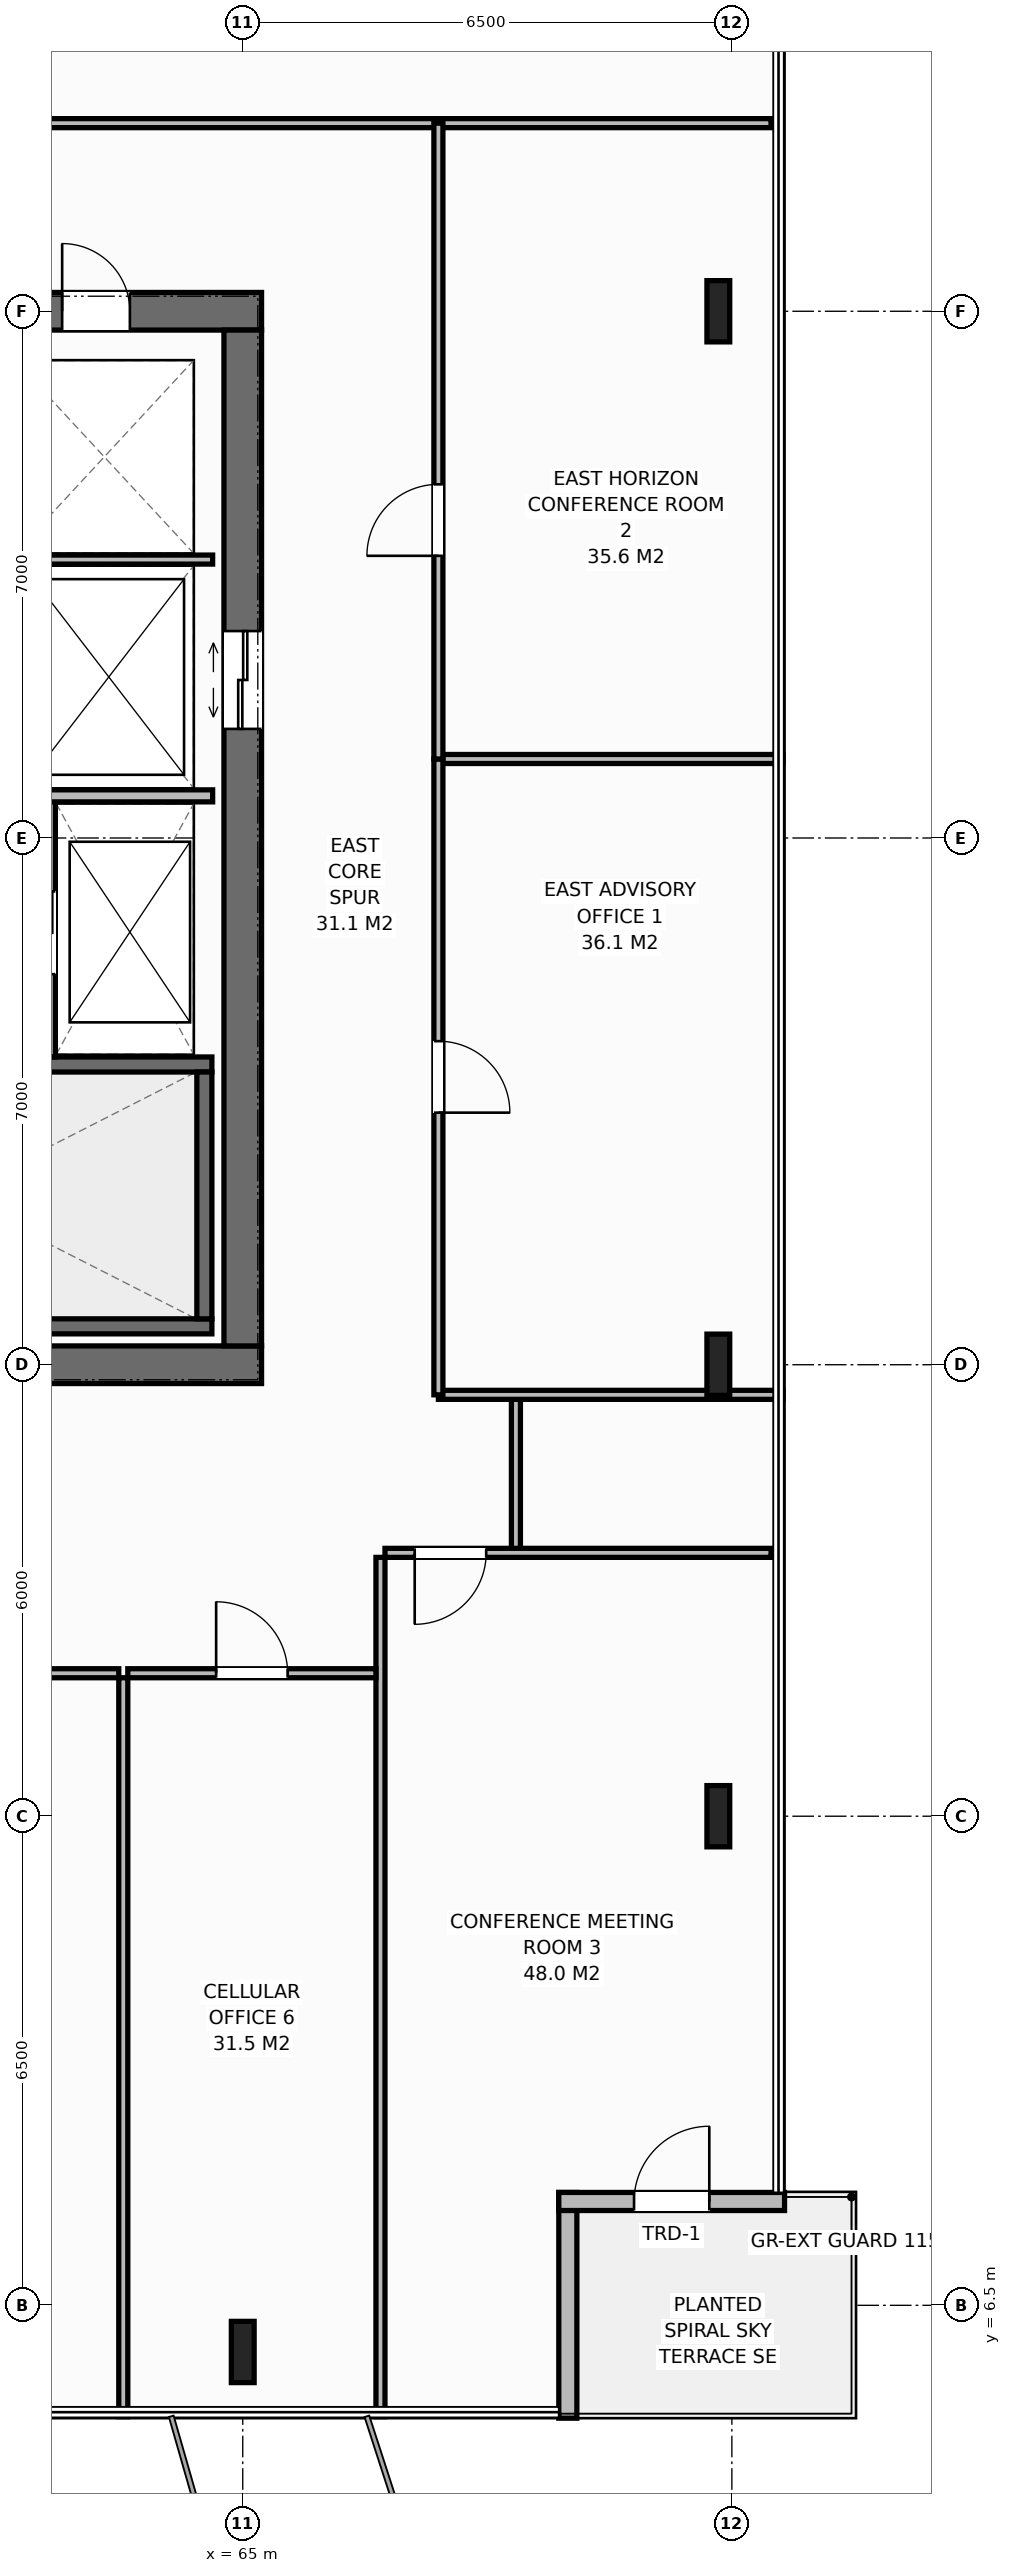
"""IFC4 building model, lengths in metres.
Left out: names, types, materials, properties, quantities, classifications, styles, units other than length and angle.
Written with IfcOpenShell. Run it as: python <this file> out.ifc"""

import sys

from ifc_helpers import new_model, si_unit, direction, frame, frame_2d, origin, origin_2d, place, context, subcontext, project, spatial, rectangle, i_section, extrude, element, fill, save


model = new_model("IFC4")
c1 = context("Model", 3, precision=1e-05, world=origin(), true_north=direction((0.0, 1.0)))
c2 = subcontext(c1, "Body", "Model", "MODEL_VIEW")
j1 = project(units=[si_unit("LENGTHUNIT", "METRE"), si_unit("PLANEANGLEUNIT", "RADIAN")], contexts=[c1])
p1 = place(None, origin())
s1 = spatial("IfcSite", under=j1, at=p1, CompositionType="ELEMENT")
p2 = place(p1, origin())
s2 = spatial("IfcBuilding", under=s1, at=p2, CompositionType="ELEMENT")
p3 = place(p2, frame((0.0, 0.0, 244.2)))
s3 = spatial("IfcBuildingStorey", under=s2, at=p3, CompositionType="ELEMENT", Elevation=244.2)
p4 = place(p3, frame((51.75, 19.0, 0.0), z_axis=(0.0, 0.0, 1.0), x_axis=(1.0, 0.0, 0.0)))
e1 = element("IfcWall", 1, at=p4, inside=s3, PredefinedType="SHEAR", context=c2, shape_type="SweptSolid", body=[
    extrude(rectangle(XDim=13.5, YDim=0.5, at=frame_2d((6.75, 0.0))), origin(), (0.0, 0.0, 1.0), 3.8),
])
p5 = place(p4, frame((2.97, 0.0, 0.0)))
e2 = element("IfcOpeningElement", 2, at=p5, cuts=e1, PredefinedType="OPENING", context=c2, shape_type="SweptSolid", body=[
    extrude(rectangle(XDim=1.4, YDim=2.2, at=frame_2d((0.7, 1.1))), frame((0.0, 0.26, 0.0), z_axis=(0.0, -1.0, 0.0), x_axis=(1.0, 0.0, 0.0)), (0.0, 0.0, 1.0), 0.52),
])
p6 = place(p3, frame((51.75, 33.0, 0.0), z_axis=(0.0, 0.0, 1.0), x_axis=(1.0, 0.0, 0.0)))
e3 = element("IfcWall", 3, at=p6, inside=s3, PredefinedType="SHEAR", context=c2, shape_type="SweptSolid", body=[
    extrude(rectangle(XDim=13.5, YDim=0.5, at=frame_2d((6.75, 0.0))), origin(), (0.0, 0.0, 1.0), 3.8),
])
p7 = place(p6, frame((2.97, 0.0, 0.0)))
e4 = element("IfcOpeningElement", 4, at=p7, cuts=e3, PredefinedType="OPENING", context=c2, shape_type="SweptSolid", body=[
    extrude(rectangle(XDim=1.4, YDim=2.2, at=frame_2d((0.7, 1.1))), frame((0.0, 0.26, 0.0), z_axis=(0.0, -1.0, 0.0), x_axis=(1.0, 0.0, 0.0)), (0.0, 0.0, 1.0), 0.52),
])
p8 = place(p6, frame((10.85, 0.0, 0.0)))
e5 = element("IfcOpeningElement", 5, at=p8, cuts=e3, PredefinedType="OPENING", context=c2, shape_type="SweptSolid", body=[
    extrude(rectangle(XDim=0.9, YDim=2.15, at=frame_2d((0.45, 1.075))), frame((0.0, 0.26, 0.0), z_axis=(0.0, -1.0, 0.0), x_axis=(1.0, 0.0, 0.0)), (0.0, 0.0, 1.0), 0.52),
])
p9 = place(p6, frame((5.8, 0.0, 0.0)))
e6 = element("IfcOpeningElement", 6, at=p9, cuts=e3, PredefinedType="OPENING", context=c2, shape_type="SweptSolid", body=[
    extrude(rectangle(XDim=0.9, YDim=2.15, at=frame_2d((0.45, 1.075))), frame((0.0, 0.26, 0.0), z_axis=(0.0, -1.0, 0.0), x_axis=(1.0, 0.0, 0.0)), (0.0, 0.0, 1.0), 0.52),
])
p10 = place(p6, frame((8.2, 0.0, 0.0)))
e7 = element("IfcOpeningElement", 7, at=p10, cuts=e3, PredefinedType="OPENING", context=c2, shape_type="SweptSolid", body=[
    extrude(rectangle(XDim=0.95, YDim=2.15, at=frame_2d((0.475, 1.075))), frame((0.0, 0.26, 0.0), z_axis=(0.0, -1.0, 0.0), x_axis=(1.0, 0.0, 0.0)), (0.0, 0.0, 1.0), 0.52),
])
p11 = place(p3, frame((65.0, 19.25, 0.0), z_axis=(0.0, 0.0, 1.0), x_axis=(0.0, 1.0, 0.0)))
e8 = element("IfcWall", 8, at=p11, inside=s3, PredefinedType="SHEAR", context=c2, shape_type="SweptSolid", body=[
    extrude(rectangle(XDim=13.5, YDim=0.5, at=frame_2d((6.75, 0.0))), origin(), (0.0, 0.0, 1.0), 3.8),
])
p12 = place(p11, frame((8.2, 0.0, 0.0)))
e9 = element("IfcOpeningElement", 9, at=p12, cuts=e8, PredefinedType="OPENING", context=c2, shape_type="SweptSolid", body=[
    extrude(rectangle(XDim=1.3, YDim=2.2, at=frame_2d((0.65, 1.1))), frame((0.0, 0.26, 0.0), z_axis=(0.0, -1.0, 0.0), x_axis=(1.0, 0.0, 0.0)), (0.0, 0.0, 1.0), 0.52),
])
p13 = place(p3, frame((56.16, 19.51, 0.0), z_axis=(0.0, 0.0, 1.0), x_axis=(1.0, 0.0, 0.0)))
e10 = element("IfcWall", 10, at=p13, inside=s3, PredefinedType="SHEAR", context=c2, shape_type="SweptSolid", body=[
    extrude(rectangle(XDim=8.43, YDim=0.2, at=frame_2d((4.215, 0.0))), origin(), (0.0, 0.0, 1.0), 3.8),
])
p14 = place(p3, frame((56.16, 22.99, 0.0), z_axis=(0.0, 0.0, 1.0), x_axis=(1.0, 0.0, 0.0)))
e11 = element("IfcWall", 11, at=p14, inside=s3, PredefinedType="SHEAR", context=c2, shape_type="SweptSolid", body=[
    extrude(rectangle(XDim=8.43, YDim=0.2, at=frame_2d((4.215, 0.0))), origin(), (0.0, 0.0, 1.0), 3.8),
])
p15 = place(p14, frame((0.45, 0.0, 0.0)))
e12 = element("IfcOpeningElement", 12, at=p15, cuts=e11, PredefinedType="OPENING", context=c2, shape_type="SweptSolid", body=[
    extrude(rectangle(XDim=1.0, YDim=2.15, at=frame_2d((0.5, 1.075))), frame((0.0, 0.11, 0.0), z_axis=(0.0, -1.0, 0.0), x_axis=(1.0, 0.0, 0.0)), (0.0, 0.0, 1.0), 0.22),
])
p16 = place(p3, frame((64.49, 19.61, 0.0), z_axis=(0.0, 0.0, 1.0), x_axis=(0.0, 1.0, 0.0)))
e13 = element("IfcWall", 13, at=p16, inside=s3, PredefinedType="SHEAR", context=c2, shape_type="SweptSolid", body=[
    extrude(rectangle(XDim=3.28, YDim=0.2, at=frame_2d((1.64, 0.0))), origin(), (0.0, 0.0, 1.0), 3.8),
])
for number, where, z_axis, x_axis in (
    (14, (65.0, 5.88, 0.0), (0.0, 0.0, 1.0), (1.0, 0.0, 0.0)),
    (15, (71.32, 13.0, 0.0), (0.0, 0.0, 1.0), (1.0, 0.0, 0.0)),
    (16, (71.32, 19.0, 0.0), (0.0, 0.0, 1.0), (1.0, 0.0, 0.0)),
    (17, (71.32, 33.0, 0.0), (0.0, 0.0, 1.0), (1.0, 0.0, 0.0)),
):
    element("IfcColumn", number, at=place(p3, frame(where, z_axis=z_axis, x_axis=x_axis)), inside=s3, PredefinedType="COLUMN", context=c2, shape_type="SweptSolid", body=[
        extrude(i_section(OverallWidth=0.303, OverallDepth=0.814, WebThickness=0.021, FlangeThickness=0.04, at=origin_2d()), origin(), (0.0, 0.0, 1.0), 3.8),
    ])
p17 = place(p3, frame((69.32, 8.0, 0.0), z_axis=(0.0, 0.0, 1.0), x_axis=(0.0, -1.0, 0.0)))
e18 = element("IfcWall", 18, at=p17, inside=s3, PredefinedType="STANDARD", context=c2, shape_type="SweptSolid", body=[
    extrude(rectangle(XDim=3.0, YDim=0.24, at=frame_2d((1.5, 0.0))), origin(), (0.0, 0.0, 1.0), 3.58),
])
p18 = place(p3, frame((72.2, 7.88, 0.0), z_axis=(0.0, 0.0, 1.0), x_axis=(-1.0, 0.0, 0.0)))
e19 = element("IfcWall", 19, at=p18, inside=s3, PredefinedType="STANDARD", context=c2, shape_type="SweptSolid", body=[
    extrude(rectangle(XDim=3.0, YDim=0.24, at=frame_2d((1.5, 0.0))), origin(), (0.0, 0.0, 1.0), 3.58),
])
p19 = place(p18, frame((1.0, 0.0, 0.0)))
e20 = element("IfcOpeningElement", 20, at=p19, cuts=e19, PredefinedType="OPENING", context=c2, shape_type="SweptSolid", body=[
    extrude(rectangle(XDim=1.0, YDim=2.2, at=frame_2d((0.5, 1.1))), frame((0.0, 0.13, 0.0), z_axis=(0.0, -1.0, 0.0), x_axis=(1.0, 0.0, 0.0)), (0.0, 0.0, 1.0), 0.26),
])
p20 = place(p3, frame((62.43, 23.09, 0.0), z_axis=(0.0, 0.0, 1.0), x_axis=(0.0, 1.0, 0.0)))
e21 = element("IfcWall", 21, at=p20, inside=s3, PredefinedType="STANDARD", context=c2, shape_type="SweptSolid", body=[
    extrude(rectangle(XDim=3.47, YDim=0.16, at=frame_2d((1.735, 0.0))), origin(), (0.0, 0.0, 1.0), 3.58),
])
p21 = place(p20, frame((1.1, 0.0, 0.0)))
e22 = element("IfcOpeningElement", 22, at=p21, cuts=e21, PredefinedType="OPENING", context=c2, shape_type="SweptSolid", body=[
    extrude(rectangle(XDim=1.1, YDim=2.2, at=frame_2d((0.55, 1.1))), frame((0.0, 0.09, 0.0), z_axis=(0.0, -1.0, 0.0), x_axis=(1.0, 0.0, 0.0)), (0.0, 0.0, 1.0), 0.18),
])
p22 = place(p3, frame((56.26, 26.56, 0.0), z_axis=(0.0, 0.0, 1.0), x_axis=(1.0, 0.0, 0.0)))
e23 = element("IfcWall", 23, at=p22, inside=s3, PredefinedType="STANDARD", context=c2, shape_type="SweptSolid", body=[
    extrude(rectangle(XDim=8.34, YDim=0.16, at=frame_2d((4.17, 0.0))), origin(), (0.0, 0.0, 1.0), 3.58),
])
p23 = place(p3, frame((61.87, 29.7, 0.0), z_axis=(0.0, 0.0, 1.0), x_axis=(1.0, 0.0, 0.0)))
e24 = element("IfcWall", 24, at=p23, inside=s3, PredefinedType="PARTITIONING", context=c2, shape_type="SweptSolid", body=[
    extrude(rectangle(XDim=2.73, YDim=0.12, at=frame_2d((1.365, 0.0))), origin(), (0.0, 0.0, 1.0), 3.58),
])
p24 = place(p3, frame((68.63, 16.5, 0.0), z_axis=(0.0, 0.0, 1.0), x_axis=(0.0, 1.0, 0.0)))
e25 = element("IfcWall", 25, at=p24, inside=s3, PredefinedType="PARTITIONING", context=c2, shape_type="SweptSolid", body=[
    extrude(rectangle(XDim=2.1, YDim=0.12, at=frame_2d((1.05, 0.0))), origin(), (0.0, 0.0, 1.0), 3.58),
])
p25 = place(p3, frame((60.378, 35.5, 0.0), z_axis=(0.0, 0.0, 1.0), x_axis=(1.0, 0.0, 0.0)))
e26 = element("IfcWall", 26, at=p25, inside=s3, PredefinedType="PARTITIONING", context=c2, shape_type="SweptSolid", body=[
    extrude(rectangle(XDim=11.642, YDim=0.12, at=frame_2d((5.821, 0.0))), origin(), (0.0, 0.0, 1.0), 3.58),
])
p26 = place(p25, frame((0.48, 0.0, 0.0)))
e27 = element("IfcOpeningElement", 27, at=p26, cuts=e26, PredefinedType="OPENING", context=c2, shape_type="SweptSolid", body=[
    extrude(rectangle(XDim=0.95, YDim=2.15, at=frame_2d((0.475, 1.075))), frame((0.0, 0.07, 0.0), z_axis=(0.0, -1.0, 0.0), x_axis=(1.0, 0.0, 0.0)), (0.0, 0.0, 1.0), 0.14),
])
p27 = place(p3, frame((63.413, 5.02, 0.0), z_axis=(0.0, 0.0, 1.0), x_axis=(0.0, 1.0, 0.0)))
e28 = element("IfcWall", 28, at=p27, inside=s3, PredefinedType="PARTITIONING", context=c2, shape_type="SweptSolid", body=[
    extrude(rectangle(XDim=9.82, YDim=0.12, at=frame_2d((4.91, 0.0))), origin(), (0.0, 0.0, 1.0), 3.58),
])
p28 = place(p3, frame((58.283, 14.9, 0.0), z_axis=(0.0, 0.0, 1.0), x_axis=(1.0, 0.0, 0.0)))
e29 = element("IfcWall", 29, at=p28, inside=s3, PredefinedType="PARTITIONING", context=c2, shape_type="SweptSolid", body=[
    extrude(rectangle(XDim=5.07, YDim=0.12, at=frame_2d((2.535, 0.0))), origin(), (0.0, 0.0, 1.0), 3.58),
])
p29 = place(p28, frame((2.06, 0.0, 0.0)))
e30 = element("IfcOpeningElement", 30, at=p29, cuts=e29, PredefinedType="OPENING", context=c2, shape_type="SweptSolid", body=[
    extrude(rectangle(XDim=0.95, YDim=2.15, at=frame_2d((0.475, 1.075))), frame((0.0, 0.07, 0.0), z_axis=(0.0, -1.0, 0.0), x_axis=(1.0, 0.0, 0.0)), (0.0, 0.0, 1.0), 0.14),
])
p30 = place(p3, frame((66.83, 5.02, 0.0), z_axis=(0.0, 0.0, 1.0), x_axis=(0.0, 1.0, 0.0)))
e31 = element("IfcWall", 31, at=p30, inside=s3, PredefinedType="PARTITIONING", context=c2, shape_type="SweptSolid", body=[
    extrude(rectangle(XDim=11.42, YDim=0.12, at=frame_2d((5.71, 0.0))), origin(), (0.0, 0.0, 1.0), 3.58),
])
p31 = place(p3, frame((63.472, 14.9, 0.0), z_axis=(0.0, 0.0, 1.0), x_axis=(1.0, 0.0, 0.0)))
e32 = element("IfcWall", 32, at=p31, inside=s3, PredefinedType="PARTITIONING", context=c2, shape_type="SweptSolid", body=[
    extrude(rectangle(XDim=3.298, YDim=0.12, at=frame_2d((1.649, 0.0))), origin(), (0.0, 0.0, 1.0), 3.58),
])
p32 = place(p31, frame((1.174, 0.0, 0.0)))
e33 = element("IfcOpeningElement", 33, at=p32, cuts=e32, PredefinedType="OPENING", context=c2, shape_type="SweptSolid", body=[
    extrude(rectangle(XDim=0.95, YDim=2.15, at=frame_2d((0.475, 1.075))), frame((0.0, 0.07, 0.0), z_axis=(0.0, -1.0, 0.0), x_axis=(1.0, 0.0, 0.0)), (0.0, 0.0, 1.0), 0.14),
])
p33 = place(p3, frame((66.89, 16.5, 0.0), z_axis=(0.0, 0.0, 1.0), x_axis=(1.0, 0.0, 0.0)))
e34 = element("IfcWall", 34, at=p33, inside=s3, PredefinedType="PARTITIONING", context=c2, shape_type="SweptSolid", body=[
    extrude(rectangle(XDim=5.13, YDim=0.12, at=frame_2d((2.565, 0.0))), origin(), (0.0, 0.0, 1.0), 3.58),
])
p34 = place(p33, frame((0.395, 0.0, 0.0)))
e35 = element("IfcOpeningElement", 35, at=p34, cuts=e34, PredefinedType="OPENING", context=c2, shape_type="SweptSolid", body=[
    extrude(rectangle(XDim=0.95, YDim=2.15, at=frame_2d((0.475, 1.075))), frame((0.0, 0.07, 0.0), z_axis=(0.0, -1.0, 0.0), x_axis=(1.0, 0.0, 0.0)), (0.0, 0.0, 1.0), 0.14),
])
for number, where, z_axis, x_axis in (
    (36, (67.6, 18.6, 0.0), (0.0, 0.0, 1.0), (1.0, 0.0, 0.0)),
    (37, (67.6, 27.05, 0.0), (0.0, 0.0, 1.0), (1.0, 0.0, 0.0)),
):
    element("IfcWall", number, at=place(p3, frame(where, z_axis=z_axis, x_axis=x_axis)), inside=s3, PredefinedType="PARTITIONING", context=c2, shape_type="SweptSolid", body=[
        extrude(rectangle(XDim=4.58, YDim=0.12, at=frame_2d((2.29, 0.0))), origin(), (0.0, 0.0, 1.0), 3.58),
    ])
p35 = place(p3, frame((67.6, 18.6, 0.0), z_axis=(0.0, 0.0, 1.0), x_axis=(0.0, 1.0, 0.0)))
e38 = element("IfcWall", 38, at=p35, inside=s3, PredefinedType="PARTITIONING", context=c2, shape_type="SweptSolid", body=[
    extrude(rectangle(XDim=8.45, YDim=0.12, at=frame_2d((4.225, 0.0))), origin(), (0.0, 0.0, 1.0), 3.58),
])
p36 = place(p35, frame((3.75, 0.0, 0.0)))
e39 = element("IfcOpeningElement", 39, at=p36, cuts=e38, PredefinedType="OPENING", context=c2, shape_type="SweptSolid", body=[
    extrude(rectangle(XDim=0.95, YDim=2.15, at=frame_2d((0.475, 1.075))), frame((0.0, 0.07, 0.0), z_axis=(0.0, -1.0, 0.0), x_axis=(1.0, 0.0, 0.0)), (0.0, 0.0, 1.0), 0.14),
])
p37 = place(p3, frame((67.6, 27.05, 0.0), z_axis=(0.0, 0.0, 1.0), x_axis=(0.0, 1.0, 0.0)))
e40 = element("IfcWall", 40, at=p37, inside=s3, PredefinedType="PARTITIONING", context=c2, shape_type="SweptSolid", body=[
    extrude(rectangle(XDim=8.45, YDim=0.12, at=frame_2d((4.225, 0.0))), origin(), (0.0, 0.0, 1.0), 3.58),
])
p38 = place(p37, frame((2.7, 0.0, 0.0)))
e41 = element("IfcOpeningElement", 41, at=p38, cuts=e40, PredefinedType="OPENING", context=c2, shape_type="SweptSolid", body=[
    extrude(rectangle(XDim=0.95, YDim=2.15, at=frame_2d((0.475, 1.075))), frame((0.0, 0.07, 0.0), z_axis=(0.0, -1.0, 0.0), x_axis=(1.0, 0.0, 0.0)), (0.0, 0.0, 1.0), 0.14),
])
p39 = place(p19, origin())
e42 = element("IfcDoor", 42, at=p39, inside=s3, OperationType="SINGLE_SWING_RIGHT", PredefinedType="DOOR", context=c2, shape_type="SweptSolid", body=[
    extrude(rectangle(XDim=1.0, YDim=2.2, at=frame_2d((0.5, 1.1))), frame((0.0, 0.025, 0.0), z_axis=(0.0, -1.0, 0.0), x_axis=(1.0, 0.0, 0.0)), (0.0, 0.0, 1.0), 0.05),
])
fill(e20, e42)
p40 = place(p12, origin())
e43 = element("IfcDoor", 43, at=p40, inside=s3, OperationType="DOUBLE_DOOR_SLIDING", PredefinedType="DOOR", context=c2, shape_type="SweptSolid", body=[
    extrude(rectangle(XDim=1.3, YDim=2.2, at=frame_2d((0.65, 1.1))), frame((0.0, 0.025, 0.0), z_axis=(0.0, -1.0, 0.0), x_axis=(1.0, 0.0, 0.0)), (0.0, 0.0, 1.0), 0.05),
])
fill(e9, e43)
p41 = place(p8, origin())
e44 = element("IfcDoor", 44, at=p41, inside=s3, OperationType="SINGLE_SWING_LEFT", PredefinedType="DOOR", context=c2, shape_type="SweptSolid", body=[
    extrude(rectangle(XDim=0.9, YDim=2.15, at=frame_2d((0.45, 1.075))), frame((0.0, -0.025, 0.0), z_axis=(0.0, -1.0, 0.0), x_axis=(1.0, 0.0, 0.0)), (0.0, 0.0, 1.0), 0.05),
])
fill(e5, e44)
p42 = place(p32, origin())
e45 = element("IfcDoor", 45, at=p42, inside=s3, OperationType="SINGLE_SWING_LEFT", PredefinedType="DOOR", context=c2, shape_type="SweptSolid", body=[
    extrude(rectangle(XDim=0.95, YDim=2.15, at=frame_2d((0.475, 1.075))), frame((0.0, 0.025, 0.0), z_axis=(0.0, -1.0, 0.0), x_axis=(1.0, 0.0, 0.0)), (0.0, 0.0, 1.0), 0.05),
])
fill(e33, e45)
p43 = place(p34, origin())
e46 = element("IfcDoor", 46, at=p43, inside=s3, OperationType="SINGLE_SWING_RIGHT", PredefinedType="DOOR", context=c2, shape_type="SweptSolid", body=[
    extrude(rectangle(XDim=0.95, YDim=2.15, at=frame_2d((0.475, 1.075))), frame((0.0, 0.025, 0.0), z_axis=(0.0, -1.0, 0.0), x_axis=(1.0, 0.0, 0.0)), (0.0, 0.0, 1.0), 0.05),
])
fill(e35, e46)
p44 = place(p36, origin())
e47 = element("IfcDoor", 47, at=p44, inside=s3, OperationType="SINGLE_SWING_RIGHT", PredefinedType="DOOR", context=c2, shape_type="SweptSolid", body=[
    extrude(rectangle(XDim=0.95, YDim=2.15, at=frame_2d((0.475, 1.075))), frame((0.0, 0.025, 0.0), z_axis=(0.0, -1.0, 0.0), x_axis=(1.0, 0.0, 0.0)), (0.0, 0.0, 1.0), 0.05),
])
fill(e39, e47)
p45 = place(p38, origin())
e48 = element("IfcDoor", 48, at=p45, inside=s3, OperationType="SINGLE_SWING_LEFT", PredefinedType="DOOR", context=c2, shape_type="SweptSolid", body=[
    extrude(rectangle(XDim=0.95, YDim=2.15, at=frame_2d((0.475, 1.075))), frame((0.0, 0.025, 0.0), z_axis=(0.0, -1.0, 0.0), x_axis=(1.0, 0.0, 0.0)), (0.0, 0.0, 1.0), 0.05),
])
fill(e41, e48)
save(model, sys.argv[1])
